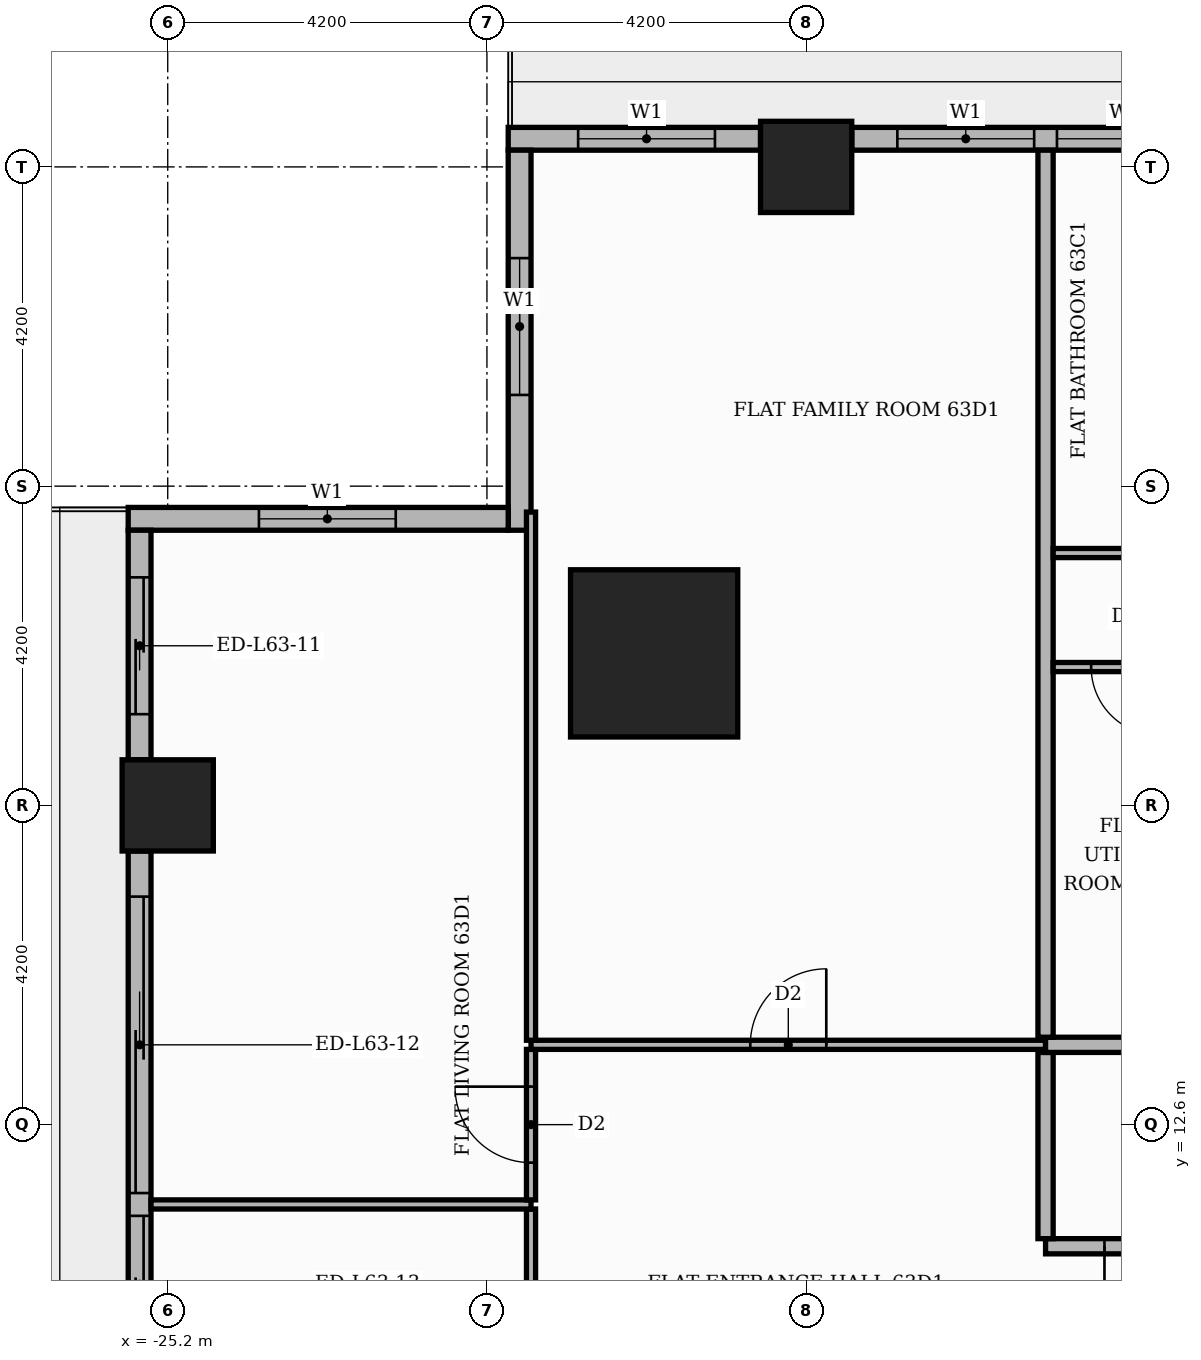
"""IFC4 building model, lengths in metres.
Left out: names, types, materials, properties, quantities, classifications, styles, units other than length and angle.
Written with IfcOpenShell. Run it as: python <this file> out.ifc"""

import sys

from ifc_helpers import new_model, si_unit, direction, frame, frame_2d, origin, origin_2d, place, context, subcontext, project, spatial, rectangle, extrude, element, fill, save


model = new_model("IFC4")
c1 = context("Model", 3, precision=1e-05, world=origin(), true_north=direction((0.0, 1.0)))
c2 = subcontext(c1, "Body", "Model", "MODEL_VIEW")
j1 = project(units=[si_unit("LENGTHUNIT", "METRE"), si_unit("PLANEANGLEUNIT", "RADIAN")], contexts=[c1])
p1 = place(None, origin())
s1 = spatial("IfcSite", under=j1, at=p1, CompositionType="ELEMENT")
p2 = place(p1, origin())
s2 = spatial("IfcBuilding", under=s1, at=p2, CompositionType="ELEMENT")
p3 = place(p2, frame((0.0, 0.0, 264.0)))
s3 = spatial("IfcBuildingStorey", under=s2, at=p3, CompositionType="ELEMENT", Elevation=264.0)
p4 = place(p3, frame((-18.8, 18.8, 0.0), z_axis=(0.0, 0.0, 1.0), x_axis=(1.0, 0.0, 0.0)))
e1 = element("IfcColumn", 1, at=p4, inside=s3, PredefinedType="COLUMN", context=c2, shape_type="SweptSolid", body=[
    extrude(rectangle(XDim=2.2, YDim=2.2, at=origin_2d()), origin(), (0.0, 0.0, 1.0), 3.9),
])
for number, where, z_axis, x_axis in (
    (2, (-16.8, 25.2, 0.0), (0.0, 0.0, 1.0), (1.0, 0.0, 0.0)),
    (3, (-25.2, 16.8, 0.0), (0.0, 0.0, 1.0), (1.0, 0.0, 0.0)),
):
    element("IfcColumn", number, at=place(p3, frame(where, z_axis=z_axis, x_axis=x_axis)), inside=s3, PredefinedType="COLUMN", context=c2, shape_type="SweptSolid", body=[
        extrude(rectangle(XDim=1.2, YDim=1.2, at=origin_2d()), origin(), (0.0, 0.0, 1.0), 3.9),
    ])
p5 = place(p3, frame((-9.0, 25.57, 0.0), z_axis=(0.0, 0.0, 1.0), x_axis=(-1.0, 0.0, 0.0)))
e4 = element("IfcWall", 4, at=p5, inside=s3, PredefinedType="STANDARD", context=c2, shape_type="SweptSolid", body=[
    extrude(rectangle(XDim=7.2, YDim=0.3, at=frame_2d((3.6, 0.0))), origin(), (0.0, 0.0, 1.0), 3.48),
])
p6 = place(p5, frame((0.6, 0.0, 0.9)))
e5 = element("IfcOpeningElement", 5, at=p6, cuts=e4, PredefinedType="OPENING", context=c2, shape_type="SweptSolid", body=[
    extrude(rectangle(XDim=1.8, YDim=2.1, at=frame_2d((0.9, 1.05))), frame((0.0, 0.16, 0.0), z_axis=(0.0, -1.0, 0.0), x_axis=(1.0, 0.0, 0.0)), (0.0, 0.0, 1.0), 0.32),
])
p7 = place(p5, frame((2.7, 0.0, 0.9)))
e6 = element("IfcOpeningElement", 6, at=p7, cuts=e4, PredefinedType="OPENING", context=c2, shape_type="SweptSolid", body=[
    extrude(rectangle(XDim=1.8, YDim=2.1, at=frame_2d((0.9, 1.05))), frame((0.0, 0.16, 0.0), z_axis=(0.0, -1.0, 0.0), x_axis=(1.0, 0.0, 0.0)), (0.0, 0.0, 1.0), 0.32),
])
p8 = place(p5, frame((4.8, 0.0, 0.9)))
e7 = element("IfcOpeningElement", 7, at=p8, cuts=e4, PredefinedType="OPENING", context=c2, shape_type="SweptSolid", body=[
    extrude(rectangle(XDim=1.8, YDim=2.1, at=frame_2d((0.9, 1.05))), frame((0.0, 0.16, 0.0), z_axis=(0.0, -1.0, 0.0), x_axis=(1.0, 0.0, 0.0)), (0.0, 0.0, 1.0), 0.32),
])
p9 = place(p3, frame((-17.4, 25.57, 0.0), z_axis=(0.0, 0.0, 1.0), x_axis=(-1.0, 0.0, 0.0)))
e8 = element("IfcWall", 8, at=p9, inside=s3, PredefinedType="STANDARD", context=c2, shape_type="SweptSolid", body=[
    extrude(rectangle(XDim=3.32, YDim=0.3, at=frame_2d((1.66, 0.0))), origin(), (0.0, 0.0, 1.0), 3.48),
])
p10 = place(p9, frame((0.6, 0.0, 0.9)))
e9 = element("IfcOpeningElement", 9, at=p10, cuts=e8, PredefinedType="OPENING", context=c2, shape_type="SweptSolid", body=[
    extrude(rectangle(XDim=1.8, YDim=2.1, at=frame_2d((0.9, 1.05))), frame((0.0, 0.16, 0.0), z_axis=(0.0, -1.0, 0.0), x_axis=(1.0, 0.0, 0.0)), (0.0, 0.0, 1.0), 0.32),
])
p11 = place(p3, frame((-20.57, 25.42, 0.0), z_axis=(0.0, 0.0, 1.0), x_axis=(0.0, -1.0, 0.0)))
e10 = element("IfcWall", 10, at=p11, inside=s3, PredefinedType="STANDARD", context=c2, shape_type="SweptSolid", body=[
    extrude(rectangle(XDim=5.0, YDim=0.3, at=frame_2d((2.5, 0.0))), origin(), (0.0, 0.0, 1.0), 3.48),
])
p12 = place(p11, frame((1.42, 0.0, 0.9)))
e11 = element("IfcOpeningElement", 11, at=p12, cuts=e10, PredefinedType="OPENING", context=c2, shape_type="SweptSolid", body=[
    extrude(rectangle(XDim=1.8, YDim=2.1, at=frame_2d((0.9, 1.05))), frame((0.0, 0.16, 0.0), z_axis=(0.0, -1.0, 0.0), x_axis=(1.0, 0.0, 0.0)), (0.0, 0.0, 1.0), 0.32),
])
p13 = place(p3, frame((-20.72, 20.57, 0.0), z_axis=(0.0, 0.0, 1.0), x_axis=(-1.0, 0.0, 0.0)))
e12 = element("IfcWall", 12, at=p13, inside=s3, PredefinedType="STANDARD", context=c2, shape_type="SweptSolid", body=[
    extrude(rectangle(XDim=5.0, YDim=0.3, at=frame_2d((2.5, 0.0))), origin(), (0.0, 0.0, 1.0), 3.48),
])
p14 = place(p13, frame((1.48, 0.0, 0.9)))
e13 = element("IfcOpeningElement", 13, at=p14, cuts=e12, PredefinedType="OPENING", context=c2, shape_type="SweptSolid", body=[
    extrude(rectangle(XDim=1.8, YDim=2.1, at=frame_2d((0.9, 1.05))), frame((0.0, 0.16, 0.0), z_axis=(0.0, -1.0, 0.0), x_axis=(1.0, 0.0, 0.0)), (0.0, 0.0, 1.0), 0.32),
])
p15 = place(p3, frame((-25.57, 20.42, 0.0), z_axis=(0.0, 0.0, 1.0), x_axis=(0.0, -1.0, 0.0)))
e14 = element("IfcWall", 14, at=p15, inside=s3, PredefinedType="STANDARD", context=c2, shape_type="SweptSolid", body=[
    extrude(rectangle(XDim=3.02, YDim=0.3, at=frame_2d((1.51, 0.0))), origin(), (0.0, 0.0, 1.0), 3.48),
])
p16 = place(p15, frame((0.62, 0.0, 0.0)))
e15 = element("IfcOpeningElement", 15, at=p16, cuts=e14, PredefinedType="OPENING", context=c2, shape_type="SweptSolid", body=[
    extrude(rectangle(XDim=1.8, YDim=2.4, at=frame_2d((0.9, 1.2))), frame((0.0, 0.16, 0.0), z_axis=(0.0, -1.0, 0.0), x_axis=(1.0, 0.0, 0.0)), (0.0, 0.0, 1.0), 0.32),
])
p17 = place(p3, frame((-25.57, 16.2, 0.0), z_axis=(0.0, 0.0, 1.0), x_axis=(0.0, -1.0, 0.0)))
e16 = element("IfcWall", 16, at=p17, inside=s3, PredefinedType="STANDARD", context=c2, shape_type="SweptSolid", body=[
    extrude(rectangle(XDim=7.2, YDim=0.3, at=frame_2d((3.6, 0.0))), origin(), (0.0, 0.0, 1.0), 3.48),
])
p18 = place(p17, frame((0.6, 0.0, 0.0)))
e17 = element("IfcOpeningElement", 17, at=p18, cuts=e16, PredefinedType="OPENING", context=c2, shape_type="SweptSolid", body=[
    extrude(rectangle(XDim=3.9, YDim=2.4, at=frame_2d((1.95, 1.2))), frame((0.0, 0.16, 0.0), z_axis=(0.0, -1.0, 0.0), x_axis=(1.0, 0.0, 0.0)), (0.0, 0.0, 1.0), 0.32),
])
p19 = place(p17, frame((4.8, 0.0, 0.0)))
e18 = element("IfcOpeningElement", 18, at=p19, cuts=e16, PredefinedType="OPENING", context=c2, shape_type="SweptSolid", body=[
    extrude(rectangle(XDim=1.8, YDim=2.4, at=frame_2d((0.9, 1.2))), frame((0.0, 0.16, 0.0), z_axis=(0.0, -1.0, 0.0), x_axis=(1.0, 0.0, 0.0)), (0.0, 0.0, 1.0), 0.32),
])
p20 = place(p3, frame((-20.42, 3.21, 0.0), z_axis=(0.0, 0.0, 1.0), x_axis=(0.0, 1.0, 0.0)))
e19 = element("IfcWall", 19, at=p20, inside=s3, PredefinedType="PARTITIONING", context=c2, shape_type="SweptSolid", body=[
    extrude(rectangle(XDim=8.28, YDim=0.12, at=frame_2d((4.14, 0.0))), origin(), (0.0, 0.0, 1.0), 3.48),
])
p21 = place(p20, frame((3.69, 0.0, 0.0)))
e20 = element("IfcOpeningElement", 20, at=p21, cuts=e19, PredefinedType="OPENING", context=c2, shape_type="SweptSolid", body=[
    extrude(rectangle(XDim=0.9, YDim=2.1, at=frame_2d((0.45, 1.05))), frame((0.0, 0.07, 0.0), z_axis=(0.0, -1.0, 0.0), x_axis=(1.0, 0.0, 0.0)), (0.0, 0.0, 1.0), 0.14),
])
p22 = place(p3, frame((-13.65, 11.0, 0.0), z_axis=(0.0, 0.0, 1.0), x_axis=(1.0, 0.0, 0.0)))
e21 = element("IfcWall", 21, at=p22, inside=s3, PredefinedType="PARTITIONING", context=c2, shape_type="SweptSolid", body=[
    extrude(rectangle(XDim=2.65, YDim=0.2, at=frame_2d((1.325, 0.0))), origin(), (0.0, 0.0, 1.0), 3.48),
])
p23 = place(p22, frame((0.775, 0.0, 0.0)))
e22 = element("IfcOpeningElement", 22, at=p23, cuts=e21, PredefinedType="OPENING", context=c2, shape_type="SweptSolid", body=[
    extrude(rectangle(XDim=1.1, YDim=2.4, at=frame_2d((0.55, 1.2))), frame((0.0, 0.11, 0.0), z_axis=(0.0, -1.0, 0.0), x_axis=(1.0, 0.0, 0.0)), (0.0, 0.0, 1.0), 0.22),
])
p24 = place(p3, frame((-13.65, 11.1, 0.0), z_axis=(0.0, 0.0, 1.0), x_axis=(0.0, 1.0, 0.0)))
e23 = element("IfcWall", 23, at=p24, inside=s3, PredefinedType="PARTITIONING", context=c2, shape_type="SweptSolid", body=[
    extrude(rectangle(XDim=2.45, YDim=0.2, at=frame_2d((1.225, 0.0))), origin(), (0.0, 0.0, 1.0), 3.48),
])
p25 = place(p3, frame((-25.42, 11.55, 0.0), z_axis=(0.0, 0.0, 1.0), x_axis=(1.0, 0.0, 0.0)))
e24 = element("IfcWall", 24, at=p25, inside=s3, PredefinedType="PARTITIONING", context=c2, shape_type="SweptSolid", body=[
    extrude(rectangle(XDim=5.0, YDim=0.12, at=frame_2d((2.5, 0.0))), origin(), (0.0, 0.0, 1.0), 3.48),
])
p26 = place(p3, frame((-20.42, 11.61, 0.0), z_axis=(0.0, 0.0, 1.0), x_axis=(0.0, 1.0, 0.0)))
e25 = element("IfcWall", 25, at=p26, inside=s3, PredefinedType="PARTITIONING", context=c2, shape_type="SweptSolid", body=[
    extrude(rectangle(XDim=1.98, YDim=0.12, at=frame_2d((0.99, 0.0))), origin(), (0.0, 0.0, 1.0), 3.48),
])
p27 = place(p26, frame((0.49, 0.0, 0.0)))
e26 = element("IfcOpeningElement", 26, at=p27, cuts=e25, PredefinedType="OPENING", context=c2, shape_type="SweptSolid", body=[
    extrude(rectangle(XDim=1.0, YDim=2.1, at=frame_2d((0.5, 1.05))), frame((0.0, 0.07, 0.0), z_axis=(0.0, -1.0, 0.0), x_axis=(1.0, 0.0, 0.0)), (0.0, 0.0, 1.0), 0.14),
])
p28 = place(p3, frame((-20.42, 13.65, 0.0), z_axis=(0.0, 0.0, 1.0), x_axis=(1.0, 0.0, 0.0)))
e27 = element("IfcWall", 27, at=p28, inside=s3, PredefinedType="PARTITIONING", context=c2, shape_type="SweptSolid", body=[
    extrude(rectangle(XDim=6.77, YDim=0.12, at=frame_2d((3.385, 0.0))), origin(), (0.0, 0.0, 1.0), 3.48),
])
p29 = place(p28, frame((2.885, 0.0, 0.0)))
e28 = element("IfcOpeningElement", 28, at=p29, cuts=e27, PredefinedType="OPENING", context=c2, shape_type="SweptSolid", body=[
    extrude(rectangle(XDim=1.0, YDim=2.1, at=frame_2d((0.5, 1.05))), frame((0.0, 0.07, 0.0), z_axis=(0.0, -1.0, 0.0), x_axis=(1.0, 0.0, 0.0)), (0.0, 0.0, 1.0), 0.14),
])
p30 = place(p3, frame((-13.65, 13.65, 0.0), z_axis=(0.0, 0.0, 1.0), x_axis=(1.0, 0.0, 0.0)))
e29 = element("IfcWall", 29, at=p30, inside=s3, PredefinedType="PARTITIONING", context=c2, shape_type="SweptSolid", body=[
    extrude(rectangle(XDim=39.07, YDim=0.2, at=frame_2d((19.535, 0.0))), origin(), (0.0, 0.0, 1.0), 3.48),
])
p31 = place(p30, frame((24.65, 0.0, 0.0)))
e30 = element("IfcOpeningElement", 30, at=p31, cuts=e29, PredefinedType="OPENING", context=c2, shape_type="SweptSolid", body=[
    extrude(rectangle(XDim=1.1, YDim=2.4, at=frame_2d((0.55, 1.2))), frame((0.0, 0.11, 0.0), z_axis=(0.0, -1.0, 0.0), x_axis=(1.0, 0.0, 0.0)), (0.0, 0.0, 1.0), 0.22),
])
p32 = place(p3, frame((-20.42, 13.71, 0.0), z_axis=(0.0, 0.0, 1.0), x_axis=(0.0, 1.0, 0.0)))
e31 = element("IfcWall", 31, at=p32, inside=s3, PredefinedType="PARTITIONING", context=c2, shape_type="SweptSolid", body=[
    extrude(rectangle(XDim=6.949, YDim=0.12, at=frame_2d((3.475, 0.0))), origin(), (0.0, 0.0, 1.0), 3.48),
])
p33 = place(p3, frame((-13.65, 13.75, 0.0), z_axis=(0.0, 0.0, 1.0), x_axis=(0.0, 1.0, 0.0)))
e32 = element("IfcWall", 32, at=p33, inside=s3, PredefinedType="PARTITIONING", context=c2, shape_type="SweptSolid", body=[
    extrude(rectangle(XDim=11.67, YDim=0.2, at=frame_2d((5.835, 0.0))), origin(), (0.0, 0.0, 1.0), 3.48),
])
p34 = place(p3, frame((-13.55, 18.62, 0.0), z_axis=(0.0, 0.0, 1.0), x_axis=(1.0, 0.0, 0.0)))
e33 = element("IfcWall", 33, at=p34, inside=s3, PredefinedType="PARTITIONING", context=c2, shape_type="SweptSolid", body=[
    extrude(rectangle(XDim=23.0, YDim=0.12, at=frame_2d((11.5, 0.0))), origin(), (0.0, 0.0, 1.0), 3.48),
])
p35 = place(p34, frame((19.25, 0.0, 0.0)))
e34 = element("IfcOpeningElement", 34, at=p35, cuts=e33, PredefinedType="OPENING", context=c2, shape_type="SweptSolid", body=[
    extrude(rectangle(XDim=0.9, YDim=2.1, at=frame_2d((0.45, 1.05))), frame((0.0, 0.07, 0.0), z_axis=(0.0, -1.0, 0.0), x_axis=(1.0, 0.0, 0.0)), (0.0, 0.0, 1.0), 0.14),
])
p36 = place(p34, frame((14.0, 0.0, 0.0)))
e35 = element("IfcOpeningElement", 35, at=p36, cuts=e33, PredefinedType="OPENING", context=c2, shape_type="SweptSolid", body=[
    extrude(rectangle(XDim=0.9, YDim=2.1, at=frame_2d((0.45, 1.05))), frame((0.0, 0.07, 0.0), z_axis=(0.0, -1.0, 0.0), x_axis=(1.0, 0.0, 0.0)), (0.0, 0.0, 1.0), 0.14),
])
p37 = place(p34, frame((11.15, 0.0, 0.0)))
e36 = element("IfcOpeningElement", 36, at=p37, cuts=e33, PredefinedType="OPENING", context=c2, shape_type="SweptSolid", body=[
    extrude(rectangle(XDim=0.9, YDim=2.1, at=frame_2d((0.45, 1.05))), frame((0.0, 0.07, 0.0), z_axis=(0.0, -1.0, 0.0), x_axis=(1.0, 0.0, 0.0)), (0.0, 0.0, 1.0), 0.14),
])
p38 = place(p34, frame((6.95, 0.0, 0.0)))
e37 = element("IfcOpeningElement", 37, at=p38, cuts=e33, PredefinedType="OPENING", context=c2, shape_type="SweptSolid", body=[
    extrude(rectangle(XDim=0.9, YDim=2.1, at=frame_2d((0.45, 1.05))), frame((0.0, 0.07, 0.0), z_axis=(0.0, -1.0, 0.0), x_axis=(1.0, 0.0, 0.0)), (0.0, 0.0, 1.0), 0.14),
])
p39 = place(p34, frame((2.6, 0.0, 0.0)))
e38 = element("IfcOpeningElement", 38, at=p39, cuts=e33, PredefinedType="OPENING", context=c2, shape_type="SweptSolid", body=[
    extrude(rectangle(XDim=0.9, YDim=2.1, at=frame_2d((0.45, 1.05))), frame((0.0, 0.07, 0.0), z_axis=(0.0, -1.0, 0.0), x_axis=(1.0, 0.0, 0.0)), (0.0, 0.0, 1.0), 0.14),
])
p40 = place(p34, frame((0.5, 0.0, 0.0)))
e39 = element("IfcOpeningElement", 39, at=p40, cuts=e33, PredefinedType="OPENING", context=c2, shape_type="SweptSolid", body=[
    extrude(rectangle(XDim=0.9, YDim=2.1, at=frame_2d((0.45, 1.05))), frame((0.0, 0.07, 0.0), z_axis=(0.0, -1.0, 0.0), x_axis=(1.0, 0.0, 0.0)), (0.0, 0.0, 1.0), 0.14),
])
p41 = place(p3, frame((-13.55, 20.12, 0.0), z_axis=(0.0, 0.0, 1.0), x_axis=(1.0, 0.0, 0.0)))
e40 = element("IfcWall", 40, at=p41, inside=s3, PredefinedType="PARTITIONING", context=c2, shape_type="SweptSolid", body=[
    extrude(rectangle(XDim=34.269, YDim=0.12, at=frame_2d((17.135, 0.0))), origin(), (0.0, 0.0, 1.0), 3.48),
])
p42 = place(p41, frame((27.75, 0.0, 0.0)))
e41 = element("IfcOpeningElement", 41, at=p42, cuts=e40, PredefinedType="OPENING", context=c2, shape_type="SweptSolid", body=[
    extrude(rectangle(XDim=1.0, YDim=2.1, at=frame_2d((0.5, 1.05))), frame((0.0, 0.07, 0.0), z_axis=(0.0, -1.0, 0.0), x_axis=(1.0, 0.0, 0.0)), (0.0, 0.0, 1.0), 0.14),
])
p43 = place(p41, frame((22.5, 0.0, 0.0)))
e42 = element("IfcOpeningElement", 42, at=p43, cuts=e40, PredefinedType="OPENING", context=c2, shape_type="SweptSolid", body=[
    extrude(rectangle(XDim=1.0, YDim=2.1, at=frame_2d((0.5, 1.05))), frame((0.0, 0.07, 0.0), z_axis=(0.0, -1.0, 0.0), x_axis=(1.0, 0.0, 0.0)), (0.0, 0.0, 1.0), 0.14),
])
p44 = place(p41, frame((14.15, 0.0, 0.0)))
e43 = element("IfcOpeningElement", 43, at=p44, cuts=e40, PredefinedType="OPENING", context=c2, shape_type="SweptSolid", body=[
    extrude(rectangle(XDim=0.9, YDim=2.1, at=frame_2d((0.45, 1.05))), frame((0.0, 0.07, 0.0), z_axis=(0.0, -1.0, 0.0), x_axis=(1.0, 0.0, 0.0)), (0.0, 0.0, 1.0), 0.14),
])
p45 = place(p41, frame((3.65, 0.0, 0.0)))
e44 = element("IfcOpeningElement", 44, at=p45, cuts=e40, PredefinedType="OPENING", context=c2, shape_type="SweptSolid", body=[
    extrude(rectangle(XDim=0.9, YDim=2.1, at=frame_2d((0.45, 1.05))), frame((0.0, 0.07, 0.0), z_axis=(0.0, -1.0, 0.0), x_axis=(1.0, 0.0, 0.0)), (0.0, 0.0, 1.0), 0.14),
])
p46 = place(p7, origin())
e45 = element("IfcWindow", 45, at=p46, inside=s3, PartitioningType="SINGLE_PANEL", PredefinedType="WINDOW", context=c2, shape_type="SweptSolid", body=[
    extrude(rectangle(XDim=1.8, YDim=2.1, at=frame_2d((0.9, 1.05))), frame((0.0, 0.03, 0.0), z_axis=(0.0, -1.0, 0.0), x_axis=(1.0, 0.0, 0.0)), (0.0, 0.0, 1.0), 0.06),
])
fill(e6, e45)
p47 = place(p8, origin())
e46 = element("IfcWindow", 46, at=p47, inside=s3, PartitioningType="SINGLE_PANEL", PredefinedType="WINDOW", context=c2, shape_type="SweptSolid", body=[
    extrude(rectangle(XDim=1.8, YDim=2.1, at=frame_2d((0.9, 1.05))), frame((0.0, 0.03, 0.0), z_axis=(0.0, -1.0, 0.0), x_axis=(1.0, 0.0, 0.0)), (0.0, 0.0, 1.0), 0.06),
])
fill(e7, e46)
p48 = place(p10, origin())
e47 = element("IfcWindow", 47, at=p48, inside=s3, PartitioningType="SINGLE_PANEL", PredefinedType="WINDOW", context=c2, shape_type="SweptSolid", body=[
    extrude(rectangle(XDim=1.8, YDim=2.1, at=frame_2d((0.9, 1.05))), frame((0.0, 0.03, 0.0), z_axis=(0.0, -1.0, 0.0), x_axis=(1.0, 0.0, 0.0)), (0.0, 0.0, 1.0), 0.06),
])
fill(e9, e47)
p49 = place(p12, origin())
e48 = element("IfcWindow", 48, at=p49, inside=s3, PartitioningType="SINGLE_PANEL", PredefinedType="WINDOW", context=c2, shape_type="SweptSolid", body=[
    extrude(rectangle(XDim=1.8, YDim=2.1, at=frame_2d((0.9, 1.05))), frame((0.0, 0.03, 0.0), z_axis=(0.0, -1.0, 0.0), x_axis=(1.0, 0.0, 0.0)), (0.0, 0.0, 1.0), 0.06),
])
fill(e11, e48)
p50 = place(p14, origin())
e49 = element("IfcWindow", 49, at=p50, inside=s3, PartitioningType="SINGLE_PANEL", PredefinedType="WINDOW", context=c2, shape_type="SweptSolid", body=[
    extrude(rectangle(XDim=1.8, YDim=2.1, at=frame_2d((0.9, 1.05))), frame((0.0, 0.03, 0.0), z_axis=(0.0, -1.0, 0.0), x_axis=(1.0, 0.0, 0.0)), (0.0, 0.0, 1.0), 0.06),
])
fill(e13, e49)
p51 = place(p16, origin())
e50 = element("IfcDoor", 50, at=p51, inside=s3, OperationType="SLIDING_TO_RIGHT", PredefinedType="DOOR", context=c2, shape_type="SweptSolid", body=[
    extrude(rectangle(XDim=1.8, YDim=2.4, at=frame_2d((0.9, 1.2))), frame((0.0, 0.025, 0.0), z_axis=(0.0, -1.0, 0.0), x_axis=(1.0, 0.0, 0.0)), (0.0, 0.0, 1.0), 0.05),
])
fill(e15, e50)
p52 = place(p18, origin())
e51 = element("IfcDoor", 51, at=p52, inside=s3, OperationType="SLIDING_TO_LEFT", PredefinedType="DOOR", context=c2, shape_type="SweptSolid", body=[
    extrude(rectangle(XDim=3.9, YDim=2.4, at=frame_2d((1.95, 1.2))), frame((0.0, 0.025, 0.0), z_axis=(0.0, -1.0, 0.0), x_axis=(1.0, 0.0, 0.0)), (0.0, 0.0, 1.0), 0.05),
])
fill(e17, e51)
p53 = place(p19, origin())
e52 = element("IfcDoor", 52, at=p53, inside=s3, OperationType="SLIDING_TO_RIGHT", PredefinedType="DOOR", context=c2, shape_type="SweptSolid", body=[
    extrude(rectangle(XDim=1.8, YDim=2.4, at=frame_2d((0.9, 1.2))), frame((0.0, 0.025, 0.0), z_axis=(0.0, -1.0, 0.0), x_axis=(1.0, 0.0, 0.0)), (0.0, 0.0, 1.0), 0.05),
])
fill(e18, e52)
p54 = place(p40, frame((0.9, 0.0, 0.0), z_axis=(0.0, 0.0, 1.0), x_axis=(-1.0, 0.0, 0.0)))
e53 = element("IfcDoor", 53, at=p54, inside=s3, OperationType="SINGLE_SWING_RIGHT", PredefinedType="DOOR", context=c2, shape_type="SweptSolid", body=[
    extrude(rectangle(XDim=0.9, YDim=2.1, at=frame_2d((0.45, 1.05))), frame((0.0, 0.025, 0.0), z_axis=(0.0, -1.0, 0.0), x_axis=(1.0, 0.0, 0.0)), (0.0, 0.0, 1.0), 0.05),
])
fill(e39, e53)
p55 = place(p23, frame((1.1, 0.0, 0.0), z_axis=(0.0, 0.0, 1.0), x_axis=(-1.0, 0.0, 0.0)))
e54 = element("IfcDoor", 54, at=p55, inside=s3, OperationType="SINGLE_SWING_LEFT", PredefinedType="DOOR", context=c2, shape_type="SweptSolid", body=[
    extrude(rectangle(XDim=1.1, YDim=2.4, at=frame_2d((0.55, 1.2))), frame((0.0, 0.025, 0.0), z_axis=(0.0, -1.0, 0.0), x_axis=(1.0, 0.0, 0.0)), (0.0, 0.0, 1.0), 0.05),
])
fill(e22, e54)
p56 = place(p29, origin())
e55 = element("IfcDoor", 55, at=p56, inside=s3, OperationType="SINGLE_SWING_RIGHT", PredefinedType="DOOR", context=c2, shape_type="SweptSolid", body=[
    extrude(rectangle(XDim=1.0, YDim=2.1, at=frame_2d((0.5, 1.05))), frame((0.0, 0.025, 0.0), z_axis=(0.0, -1.0, 0.0), x_axis=(1.0, 0.0, 0.0)), (0.0, 0.0, 1.0), 0.05),
])
fill(e28, e55)
p57 = place(p27, origin())
e56 = element("IfcDoor", 56, at=p57, inside=s3, OperationType="SINGLE_SWING_RIGHT", PredefinedType="DOOR", context=c2, shape_type="SweptSolid", body=[
    extrude(rectangle(XDim=1.0, YDim=2.1, at=frame_2d((0.5, 1.05))), frame((0.0, 0.025, 0.0), z_axis=(0.0, -1.0, 0.0), x_axis=(1.0, 0.0, 0.0)), (0.0, 0.0, 1.0), 0.05),
])
fill(e26, e56)
save(model, sys.argv[1])
